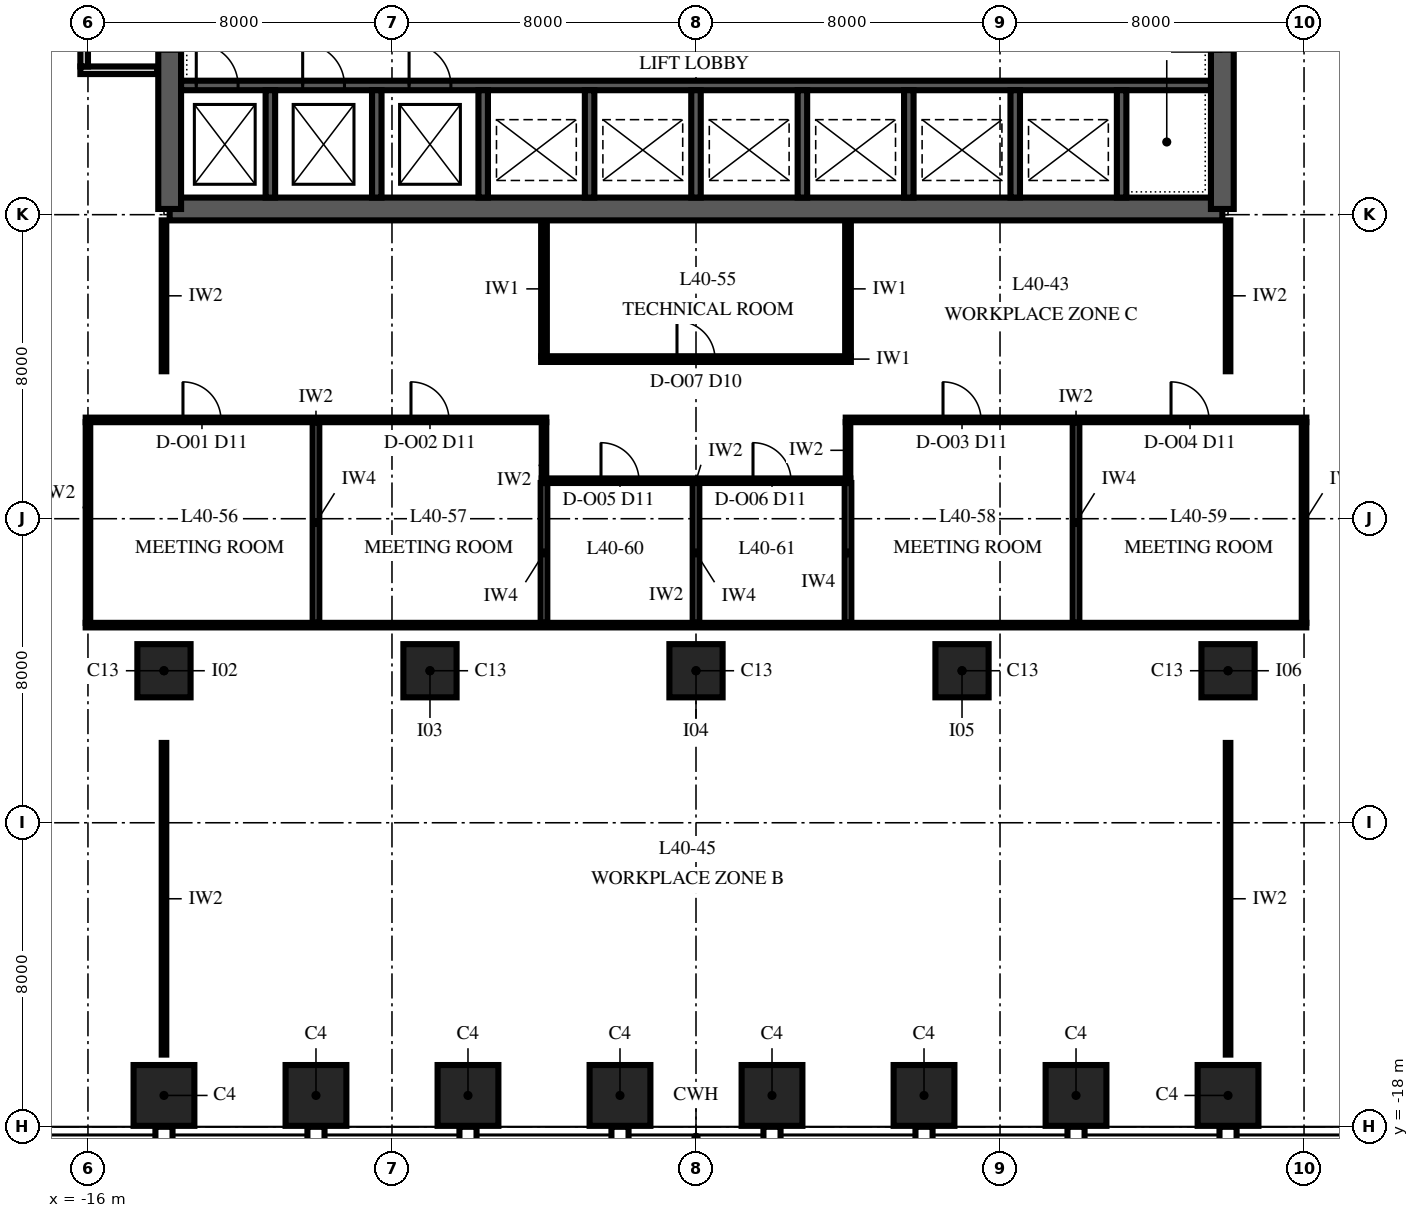
"""IFC4 building model, lengths in metres.
Left out: names, types, materials, properties, quantities, classifications, styles, units other than length and angle.
Written with IfcOpenShell. Run it as: python <this file> out.ifc"""

import sys

from ifc_helpers import new_model, si_unit, direction, frame, frame_2d, origin, origin_2d, place, context, subcontext, project, spatial, polyline, rectangle, outline, extrude, element, fill, save


model = new_model("IFC4")
c1 = context("Model", 3, precision=1e-05, world=origin(), true_north=direction((0.0, 1.0)))
c2 = subcontext(c1, "Body", "Model", "MODEL_VIEW")
j1 = project(units=[si_unit("LENGTHUNIT", "METRE"), si_unit("PLANEANGLEUNIT", "RADIAN")], contexts=[c1])
p1 = place(None, origin())
s1 = spatial("IfcSite", under=j1, at=p1, CompositionType="ELEMENT")
p2 = place(p1, origin())
s2 = spatial("IfcBuilding", under=s1, at=p2, CompositionType="ELEMENT")
p3 = place(p2, frame((0.0, 0.0, 178.0)))
s3 = spatial("IfcBuildingStorey", under=s2, at=p3, CompositionType="ELEMENT", Elevation=178.0)
for number, where, z_axis, x_axis in (
    (1, (-14.0, -17.175, 0.0), (0.0, 0.0, 1.0), (1.0, 0.0, 0.0)),
    (2, (-10.0, -17.175, 0.0), (0.0, 0.0, 1.0), (1.0, 0.0, 0.0)),
    (3, (-6.0, -17.175, 0.0), (0.0, 0.0, 1.0), (1.0, 0.0, 0.0)),
    (4, (-2.0, -17.175, 0.0), (0.0, 0.0, 1.0), (1.0, 0.0, 0.0)),
    (5, (2.0, -17.175, 0.0), (0.0, 0.0, 1.0), (1.0, 0.0, 0.0)),
    (6, (6.0, -17.175, 0.0), (0.0, 0.0, 1.0), (1.0, 0.0, 0.0)),
    (7, (10.0, -17.175, 0.0), (0.0, 0.0, 1.0), (1.0, 0.0, 0.0)),
    (8, (14.0, -17.175, 0.0), (0.0, 0.0, 1.0), (1.0, 0.0, 0.0)),
):
    element("IfcColumn", number, at=place(p3, frame(where, z_axis=z_axis, x_axis=x_axis)), inside=s3, PredefinedType="COLUMN", context=c2, shape_type="SweptSolid", body=[
        extrude(rectangle(XDim=1.6, YDim=1.6, at=origin_2d()), origin(), (0.0, 0.0, 1.0), 4.0),
    ])
for number, where, z_axis, x_axis in (
    (9, (-14.0, -6.0, 0.0), (0.0, 0.0, 1.0), (1.0, 0.0, 0.0)),
    (10, (-7.0, -6.0, 0.0), (0.0, 0.0, 1.0), (1.0, 0.0, 0.0)),
    (11, (0.0, -6.0, 0.0), (0.0, 0.0, 1.0), (1.0, 0.0, 0.0)),
    (12, (7.0, -6.0, 0.0), (0.0, 0.0, 1.0), (1.0, 0.0, 0.0)),
    (13, (14.0, -6.0, 0.0), (0.0, 0.0, 1.0), (1.0, 0.0, 0.0)),
):
    element("IfcColumn", number, at=place(p3, frame(where, z_axis=z_axis, x_axis=x_axis)), inside=s3, PredefinedType="COLUMN", context=c2, shape_type="SweptSolid", body=[
        extrude(rectangle(XDim=1.4, YDim=1.4, at=origin_2d()), origin(), (0.0, 0.0, 1.0), 4.0),
    ])
p4 = place(p3, frame((-13.85, 6.15, 0.0), z_axis=(0.0, 0.0, 1.0), x_axis=(1.0, 0.0, 0.0)))
e14 = element("IfcWall", 14, at=p4, inside=s3, PredefinedType="SHEAR", context=c2, shape_type="SweptSolid", body=[
    extrude(rectangle(XDim=27.7, YDim=0.6, at=frame_2d((13.85, 0.0))), origin(), (0.0, 0.0, 1.0), 4.0),
])
p5 = place(p3, frame((13.85, 6.15, 0.0), z_axis=(0.0, 0.0, 1.0), x_axis=(0.0, 1.0, 0.0)))
e15 = element("IfcWall", 15, at=p5, inside=s3, PredefinedType="SHEAR", context=c2, shape_type="SweptSolid", body=[
    extrude(outline(polyline([(0.0, -0.3), (17.7, -0.3), (17.7, 0.0), (17.4, 0.0), (17.4, 0.3), (0.3, 0.3), (0.3, 0.0), (0.0, 0.0), (0.0, -0.3)])), origin(), (0.0, 0.0, 1.0), 4.0),
])
p6 = place(p5, frame((4.15, 0.0, 0.0)))
e16 = element("IfcOpeningElement", 16, at=p6, cuts=e15, PredefinedType="OPENING", context=c2, shape_type="SweptSolid", body=[
    extrude(rectangle(XDim=1.8, YDim=2.4, at=frame_2d((0.9, 1.2))), frame((0.0, 0.315, 0.0), z_axis=(0.0, -1.0, 0.0), x_axis=(1.0, 0.0, 0.0)), (0.0, 0.0, 1.0), 0.63),
])
p7 = place(p3, frame((-13.85, 23.85, 0.0), z_axis=(0.0, 0.0, 1.0), x_axis=(0.0, -1.0, 0.0)))
e17 = element("IfcWall", 17, at=p7, inside=s3, PredefinedType="SHEAR", context=c2, shape_type="SweptSolid", body=[
    extrude(outline(polyline([(0.0, -0.3), (17.7, -0.3), (17.7, 0.0), (17.4, 0.0), (17.4, 0.3), (0.3, 0.3), (0.3, 0.0), (0.0, 0.0), (0.0, -0.3)])), origin(), (0.0, 0.0, 1.0), 4.0),
])
p8 = place(p7, frame((11.75, 0.0, 0.0)))
e18 = element("IfcOpeningElement", 18, at=p8, cuts=e17, PredefinedType="OPENING", context=c2, shape_type="SweptSolid", body=[
    extrude(rectangle(XDim=1.8, YDim=2.4, at=frame_2d((0.9, 1.2))), frame((0.0, 0.315, 0.0), z_axis=(0.0, -1.0, 0.0), x_axis=(1.0, 0.0, 0.0)), (0.0, 0.0, 1.0), 0.63),
])
p9 = place(p3, frame((-13.55, 9.4, 0.0), z_axis=(0.0, 0.0, 1.0), x_axis=(1.0, 0.0, 0.0)))
e19 = element("IfcWall", 19, at=p9, inside=s3, PredefinedType="SHEAR", context=c2, shape_type="SweptSolid", body=[
    extrude(rectangle(XDim=27.1, YDim=0.25, at=frame_2d((13.55, 0.0))), origin(), (0.0, 0.0, 1.0), 4.0),
])
p10 = place(p9, frame((0.4, 0.0, 0.0)))
e20 = element("IfcOpeningElement", 20, at=p10, cuts=e19, PredefinedType="OPENING", context=c2, shape_type="SweptSolid", body=[
    extrude(rectangle(XDim=1.1, YDim=2.1, at=frame_2d((0.55, 1.05))), frame((0.0, 0.14, 0.0), z_axis=(0.0, -1.0, 0.0), x_axis=(1.0, 0.0, 0.0)), (0.0, 0.0, 1.0), 0.28),
])
p11 = place(p9, frame((3.2, 0.0, 0.0)))
e21 = element("IfcOpeningElement", 21, at=p11, cuts=e19, PredefinedType="OPENING", context=c2, shape_type="SweptSolid", body=[
    extrude(rectangle(XDim=1.1, YDim=2.1, at=frame_2d((0.55, 1.05))), frame((0.0, 0.14, 0.0), z_axis=(0.0, -1.0, 0.0), x_axis=(1.0, 0.0, 0.0)), (0.0, 0.0, 1.0), 0.28),
])
p12 = place(p9, frame((6.0, 0.0, 0.0)))
e22 = element("IfcOpeningElement", 22, at=p12, cuts=e19, PredefinedType="OPENING", context=c2, shape_type="SweptSolid", body=[
    extrude(rectangle(XDim=1.1, YDim=2.1, at=frame_2d((0.55, 1.05))), frame((0.0, 0.14, 0.0), z_axis=(0.0, -1.0, 0.0), x_axis=(1.0, 0.0, 0.0)), (0.0, 0.0, 1.0), 0.28),
])
for number, where, z_axis, x_axis in (
    (23, (-11.2, 6.45, 0.0), (0.0, 0.0, 1.0), (0.0, 1.0, 0.0)),
    (24, (-8.4, 6.45, 0.0), (0.0, 0.0, 1.0), (0.0, 1.0, 0.0)),
    (25, (-5.6, 6.45, 0.0), (0.0, 0.0, 1.0), (0.0, 1.0, 0.0)),
    (26, (-2.8, 6.45, 0.0), (0.0, 0.0, 1.0), (0.0, 1.0, 0.0)),
    (27, (0.0, 6.45, 0.0), (0.0, 0.0, 1.0), (0.0, 1.0, 0.0)),
    (28, (2.8, 6.45, 0.0), (0.0, 0.0, 1.0), (0.0, 1.0, 0.0)),
    (29, (5.6, 6.45, 0.0), (0.0, 0.0, 1.0), (0.0, 1.0, 0.0)),
    (30, (8.4, 6.45, 0.0), (0.0, 0.0, 1.0), (0.0, 1.0, 0.0)),
    (31, (11.2, 6.45, 0.0), (0.0, 0.0, 1.0), (0.0, 1.0, 0.0)),
):
    element("IfcWall", number, at=place(p3, frame(where, z_axis=z_axis, x_axis=x_axis)), inside=s3, PredefinedType="SHEAR", context=c2, shape_type="SweptSolid", body=[
        extrude(rectangle(XDim=2.825, YDim=0.25, at=frame_2d((1.413, 0.0))), origin(), (0.0, 0.0, 1.0), 4.0),
    ])
p13 = place(p3, frame((-16.06, -4.8, 0.0), z_axis=(0.0, 0.0, 1.0), x_axis=(1.0, 0.0, 0.0)))
e32 = element("IfcWall", 32, at=p13, inside=s3, PredefinedType="PARTITIONING", context=c2, shape_type="SweptSolid", body=[
    extrude(rectangle(XDim=32.12, YDim=0.12, at=frame_2d((16.06, 0.0))), origin(), (0.0, 0.0, 1.0), 3.25),
])
p14 = place(p3, frame((-4.06, -1.0, 0.0), z_axis=(0.0, 0.0, 1.0), x_axis=(1.0, 0.0, 0.0)))
e33 = element("IfcWall", 33, at=p14, inside=s3, PredefinedType="PARTITIONING", context=c2, shape_type="SweptSolid", body=[
    extrude(rectangle(XDim=8.12, YDim=0.12, at=frame_2d((4.06, 0.0))), origin(), (0.0, 0.0, 1.0), 3.25),
])
p15 = place(p14, frame((1.56, 0.0, 0.0)))
e34 = element("IfcOpeningElement", 34, at=p15, cuts=e33, PredefinedType="OPENING", context=c2, shape_type="SweptSolid", body=[
    extrude(rectangle(XDim=1.0, YDim=2.4, at=frame_2d((0.5, 1.2))), frame((0.0, 0.075, 0.0), z_axis=(0.0, -1.0, 0.0), x_axis=(1.0, 0.0, 0.0)), (0.0, 0.0, 1.0), 0.15),
])
p16 = place(p14, frame((5.56, 0.0, 0.0)))
e35 = element("IfcOpeningElement", 35, at=p16, cuts=e33, PredefinedType="OPENING", context=c2, shape_type="SweptSolid", body=[
    extrude(rectangle(XDim=1.0, YDim=2.4, at=frame_2d((0.5, 1.2))), frame((0.0, 0.075, 0.0), z_axis=(0.0, -1.0, 0.0), x_axis=(1.0, 0.0, 0.0)), (0.0, 0.0, 1.0), 0.15),
])
p17 = place(p3, frame((-16.06, 0.6, 0.0), z_axis=(0.0, 0.0, 1.0), x_axis=(1.0, 0.0, 0.0)))
e36 = element("IfcWall", 36, at=p17, inside=s3, PredefinedType="PARTITIONING", context=c2, shape_type="SweptSolid", body=[
    extrude(rectangle(XDim=12.12, YDim=0.12, at=frame_2d((6.06, 0.0))), origin(), (0.0, 0.0, 1.0), 3.25),
])
p18 = place(p17, frame((2.56, 0.0, 0.0)))
e37 = element("IfcOpeningElement", 37, at=p18, cuts=e36, PredefinedType="OPENING", context=c2, shape_type="SweptSolid", body=[
    extrude(rectangle(XDim=1.0, YDim=2.4, at=frame_2d((0.5, 1.2))), frame((0.0, 0.075, 0.0), z_axis=(0.0, -1.0, 0.0), x_axis=(1.0, 0.0, 0.0)), (0.0, 0.0, 1.0), 0.15),
])
p19 = place(p17, frame((8.56, 0.0, 0.0)))
e38 = element("IfcOpeningElement", 38, at=p19, cuts=e36, PredefinedType="OPENING", context=c2, shape_type="SweptSolid", body=[
    extrude(rectangle(XDim=1.0, YDim=2.4, at=frame_2d((0.5, 1.2))), frame((0.0, 0.075, 0.0), z_axis=(0.0, -1.0, 0.0), x_axis=(1.0, 0.0, 0.0)), (0.0, 0.0, 1.0), 0.15),
])
p20 = place(p3, frame((3.94, 0.6, 0.0), z_axis=(0.0, 0.0, 1.0), x_axis=(1.0, 0.0, 0.0)))
e39 = element("IfcWall", 39, at=p20, inside=s3, PredefinedType="PARTITIONING", context=c2, shape_type="SweptSolid", body=[
    extrude(rectangle(XDim=12.12, YDim=0.12, at=frame_2d((6.06, 0.0))), origin(), (0.0, 0.0, 1.0), 3.25),
])
p21 = place(p20, frame((2.56, 0.0, 0.0)))
e40 = element("IfcOpeningElement", 40, at=p21, cuts=e39, PredefinedType="OPENING", context=c2, shape_type="SweptSolid", body=[
    extrude(rectangle(XDim=1.0, YDim=2.4, at=frame_2d((0.5, 1.2))), frame((0.0, 0.075, 0.0), z_axis=(0.0, -1.0, 0.0), x_axis=(1.0, 0.0, 0.0)), (0.0, 0.0, 1.0), 0.15),
])
p22 = place(p20, frame((8.56, 0.0, 0.0)))
e41 = element("IfcOpeningElement", 41, at=p22, cuts=e39, PredefinedType="OPENING", context=c2, shape_type="SweptSolid", body=[
    extrude(rectangle(XDim=1.0, YDim=2.4, at=frame_2d((0.5, 1.2))), frame((0.0, 0.075, 0.0), z_axis=(0.0, -1.0, 0.0), x_axis=(1.0, 0.0, 0.0)), (0.0, 0.0, 1.0), 0.15),
])
p23 = place(p3, frame((-4.075, 2.2, 0.0), z_axis=(0.0, 0.0, 1.0), x_axis=(1.0, 0.0, 0.0)))
e42 = element("IfcWall", 42, at=p23, inside=s3, PredefinedType="PARTITIONING", context=c2, shape_type="SweptSolid", body=[
    extrude(rectangle(XDim=8.15, YDim=0.15, at=frame_2d((4.075, 0.0))), origin(), (0.0, 0.0, 1.0), 3.25),
])
p24 = place(p23, frame((3.575, 0.0, 0.0)))
e43 = element("IfcOpeningElement", 43, at=p24, cuts=e42, PredefinedType="OPENING", context=c2, shape_type="SweptSolid", body=[
    extrude(rectangle(XDim=1.0, YDim=2.3, at=frame_2d((0.5, 1.15))), frame((0.0, 0.09, 0.0), z_axis=(0.0, -1.0, 0.0), x_axis=(1.0, 0.0, 0.0)), (0.0, 0.0, 1.0), 0.18),
])
p25 = place(p3, frame((-16.2, 9.8, 0.0), z_axis=(0.0, 0.0, 1.0), x_axis=(1.0, 0.0, 0.0)))
e44 = element("IfcWall", 44, at=p25, inside=s3, PredefinedType="PARTITIONING", context=c2, shape_type="SweptSolid", body=[
    extrude(rectangle(XDim=2.02, YDim=0.2, at=frame_2d((1.01, 0.0))), origin(), (0.0, 0.0, 1.0), 3.85),
])
p26 = place(p3, frame((-16.1, 9.9, 0.0), z_axis=(0.0, 0.0, 1.0), x_axis=(0.0, 1.0, 0.0)))
e45 = element("IfcWall", 45, at=p26, inside=s3, PredefinedType="PARTITIONING", context=c2, shape_type="SweptSolid", body=[
    extrude(rectangle(XDim=16.1, YDim=0.2, at=frame_2d((8.05, 0.0))), origin(), (0.0, 0.0, 1.0), 3.25),
])
p27 = place(p26, frame((7.88, 0.0, 0.0)))
e46 = element("IfcOpeningElement", 46, at=p27, cuts=e45, PredefinedType="OPENING", context=c2, shape_type="SweptSolid", body=[
    extrude(rectangle(XDim=1.2, YDim=2.4, at=frame_2d((0.6, 1.2))), frame((0.0, 0.115, 0.0), z_axis=(0.0, -1.0, 0.0), x_axis=(1.0, 0.0, 0.0)), (0.0, 0.0, 1.0), 0.23),
])
p28 = place(p3, frame((-16.0, -4.74, 0.0), z_axis=(0.0, 0.0, 1.0), x_axis=(0.0, 1.0, 0.0)))
e47 = element("IfcWall", 47, at=p28, inside=s3, PredefinedType="PARTITIONING", context=c2, shape_type="SweptSolid", body=[
    extrude(rectangle(XDim=5.28, YDim=0.12, at=frame_2d((2.64, 0.0))), origin(), (0.0, 0.0, 1.0), 3.85),
])
p29 = place(p3, frame((-10.0, -4.74, 0.0), z_axis=(0.0, 0.0, 1.0), x_axis=(0.0, 1.0, 0.0)))
e48 = element("IfcWall", 48, at=p29, inside=s3, PredefinedType="PARTITIONING", context=c2, shape_type="SweptSolid", body=[
    extrude(rectangle(XDim=5.28, YDim=0.175, at=frame_2d((2.64, 0.0))), origin(), (0.0, 0.0, 1.0), 3.25),
])
p30 = place(p3, frame((-4.0, -4.74, 0.0), z_axis=(0.0, 0.0, 1.0), x_axis=(0.0, 1.0, 0.0)))
e49 = element("IfcWall", 49, at=p30, inside=s3, PredefinedType="PARTITIONING", context=c2, shape_type="SweptSolid", body=[
    extrude(rectangle(XDim=3.68, YDim=0.175, at=frame_2d((1.84, 0.0))), origin(), (0.0, 0.0, 1.0), 3.85),
])
p31 = place(p3, frame((-4.0, -0.94, 0.0), z_axis=(0.0, 0.0, 1.0), x_axis=(0.0, 1.0, 0.0)))
e50 = element("IfcWall", 50, at=p31, inside=s3, PredefinedType="PARTITIONING", context=c2, shape_type="SweptSolid", body=[
    extrude(rectangle(XDim=1.48, YDim=0.12, at=frame_2d((0.74, 0.0))), origin(), (0.0, 0.0, 1.0), 3.85),
])
p32 = place(p3, frame((-4.0, 2.275, 0.0), z_axis=(0.0, 0.0, 1.0), x_axis=(0.0, 1.0, 0.0)))
e51 = element("IfcWall", 51, at=p32, inside=s3, PredefinedType="PARTITIONING", context=c2, shape_type="SweptSolid", body=[
    extrude(rectangle(XDim=3.545, YDim=0.15, at=frame_2d((1.772, 0.0))), origin(), (0.0, 0.0, 1.0), 3.85),
])
for number, where, z_axis, x_axis in (
    (52, (0.0, -4.74, 0.0), (0.0, 0.0, 1.0), (0.0, 1.0, 0.0)),
    (53, (4.0, -4.74, 0.0), (0.0, 0.0, 1.0), (0.0, 1.0, 0.0)),
):
    element("IfcWall", number, at=place(p3, frame(where, z_axis=z_axis, x_axis=x_axis)), inside=s3, PredefinedType="PARTITIONING", context=c2, shape_type="SweptSolid", body=[
        extrude(rectangle(XDim=3.68, YDim=0.175, at=frame_2d((1.84, 0.0))), origin(), (0.0, 0.0, 1.0), 3.85),
    ])
p33 = place(p3, frame((4.0, -0.94, 0.0), z_axis=(0.0, 0.0, 1.0), x_axis=(0.0, 1.0, 0.0)))
e54 = element("IfcWall", 54, at=p33, inside=s3, PredefinedType="PARTITIONING", context=c2, shape_type="SweptSolid", body=[
    extrude(rectangle(XDim=1.48, YDim=0.12, at=frame_2d((0.74, 0.0))), origin(), (0.0, 0.0, 1.0), 3.85),
])
p34 = place(p3, frame((4.0, 2.275, 0.0), z_axis=(0.0, 0.0, 1.0), x_axis=(0.0, 1.0, 0.0)))
e55 = element("IfcWall", 55, at=p34, inside=s3, PredefinedType="PARTITIONING", context=c2, shape_type="SweptSolid", body=[
    extrude(rectangle(XDim=3.545, YDim=0.15, at=frame_2d((1.772, 0.0))), origin(), (0.0, 0.0, 1.0), 3.85),
])
p35 = place(p3, frame((10.0, -4.74, 0.0), z_axis=(0.0, 0.0, 1.0), x_axis=(0.0, 1.0, 0.0)))
e56 = element("IfcWall", 56, at=p35, inside=s3, PredefinedType="PARTITIONING", context=c2, shape_type="SweptSolid", body=[
    extrude(rectangle(XDim=5.28, YDim=0.175, at=frame_2d((2.64, 0.0))), origin(), (0.0, 0.0, 1.0), 3.25),
])
p36 = place(p3, frame((16.0, -4.74, 0.0), z_axis=(0.0, 0.0, 1.0), x_axis=(0.0, 1.0, 0.0)))
e57 = element("IfcWall", 57, at=p36, inside=s3, PredefinedType="PARTITIONING", context=c2, shape_type="SweptSolid", body=[
    extrude(rectangle(XDim=5.28, YDim=0.12, at=frame_2d((2.64, 0.0))), origin(), (0.0, 0.0, 1.0), 3.85),
])
p37 = place(p3, frame((-13.999, -16.1, 0.0), z_axis=(0.0, 0.0, 1.0), x_axis=(0.0, 1.0, 0.0)))
e58 = element("IfcWall", 58, at=p37, inside=s3, PredefinedType="PARTITIONING", context=c2, shape_type="SweptSolid", body=[
    extrude(rectangle(XDim=8.2, YDim=0.12, at=frame_2d((4.1, 0.0))), origin(), (0.0, 0.0, 1.0), 3.25),
])
p38 = place(p3, frame((-13.999, 1.88, 0.0), z_axis=(0.0, 0.0, 1.0), x_axis=(0.0, 1.0, 0.0)))
e59 = element("IfcWall", 59, at=p38, inside=s3, PredefinedType="PARTITIONING", context=c2, shape_type="SweptSolid", body=[
    extrude(rectangle(XDim=3.97, YDim=0.12, at=frame_2d((1.985, 0.0))), origin(), (0.0, 0.0, 1.0), 3.25),
])
p39 = place(p3, frame((14.001, -16.1, 0.0), z_axis=(0.0, 0.0, 1.0), x_axis=(0.0, 1.0, 0.0)))
e60 = element("IfcWall", 60, at=p39, inside=s3, PredefinedType="PARTITIONING", context=c2, shape_type="SweptSolid", body=[
    extrude(rectangle(XDim=8.2, YDim=0.12, at=frame_2d((4.1, 0.0))), origin(), (0.0, 0.0, 1.0), 3.25),
])
p40 = place(p3, frame((14.001, 1.88, 0.0), z_axis=(0.0, 0.0, 1.0), x_axis=(0.0, 1.0, 0.0)))
e61 = element("IfcWall", 61, at=p40, inside=s3, PredefinedType="PARTITIONING", context=c2, shape_type="SweptSolid", body=[
    extrude(rectangle(XDim=3.97, YDim=0.12, at=frame_2d((1.985, 0.0))), origin(), (0.0, 0.0, 1.0), 3.25),
])
p41 = place(p10, origin())
e62 = element("IfcDoor", 62, at=p41, inside=s3, OperationType="SLIDING_TO_LEFT", PredefinedType="DOOR", context=c2, shape_type="SweptSolid", body=[
    extrude(rectangle(XDim=1.1, YDim=2.1, at=frame_2d((0.55, 1.05))), frame((0.0, 0.125, 0.0), z_axis=(0.0, -1.0, 0.0), x_axis=(1.0, 0.0, 0.0)), (0.0, 0.0, 1.0), 0.25),
])
fill(e20, e62)
p42 = place(p11, origin())
e63 = element("IfcDoor", 63, at=p42, inside=s3, OperationType="SLIDING_TO_LEFT", PredefinedType="DOOR", context=c2, shape_type="SweptSolid", body=[
    extrude(rectangle(XDim=1.1, YDim=2.1, at=frame_2d((0.55, 1.05))), frame((0.0, 0.125, 0.0), z_axis=(0.0, -1.0, 0.0), x_axis=(1.0, 0.0, 0.0)), (0.0, 0.0, 1.0), 0.25),
])
fill(e21, e63)
p43 = place(p12, origin())
e64 = element("IfcDoor", 64, at=p43, inside=s3, OperationType="SLIDING_TO_LEFT", PredefinedType="DOOR", context=c2, shape_type="SweptSolid", body=[
    extrude(rectangle(XDim=1.1, YDim=2.1, at=frame_2d((0.55, 1.05))), frame((0.0, 0.125, 0.0), z_axis=(0.0, -1.0, 0.0), x_axis=(1.0, 0.0, 0.0)), (0.0, 0.0, 1.0), 0.25),
])
fill(e22, e64)
p44 = place(p18, origin())
e65 = element("IfcDoor", 65, at=p44, inside=s3, OperationType="SINGLE_SWING_RIGHT", PredefinedType="DOOR", context=c2, shape_type="SweptSolid", body=[
    extrude(rectangle(XDim=1.0, YDim=2.4, at=frame_2d((0.5, 1.2))), frame((0.0, 0.06, 0.0), z_axis=(0.0, -1.0, 0.0), x_axis=(1.0, 0.0, 0.0)), (0.0, 0.0, 1.0), 0.12),
])
fill(e37, e65)
p45 = place(p19, origin())
e66 = element("IfcDoor", 66, at=p45, inside=s3, OperationType="SINGLE_SWING_RIGHT", PredefinedType="DOOR", context=c2, shape_type="SweptSolid", body=[
    extrude(rectangle(XDim=1.0, YDim=2.4, at=frame_2d((0.5, 1.2))), frame((0.0, 0.06, 0.0), z_axis=(0.0, -1.0, 0.0), x_axis=(1.0, 0.0, 0.0)), (0.0, 0.0, 1.0), 0.12),
])
fill(e38, e66)
p46 = place(p21, origin())
e67 = element("IfcDoor", 67, at=p46, inside=s3, OperationType="SINGLE_SWING_RIGHT", PredefinedType="DOOR", context=c2, shape_type="SweptSolid", body=[
    extrude(rectangle(XDim=1.0, YDim=2.4, at=frame_2d((0.5, 1.2))), frame((0.0, 0.06, 0.0), z_axis=(0.0, -1.0, 0.0), x_axis=(1.0, 0.0, 0.0)), (0.0, 0.0, 1.0), 0.12),
])
fill(e40, e67)
p47 = place(p22, origin())
e68 = element("IfcDoor", 68, at=p47, inside=s3, OperationType="SINGLE_SWING_RIGHT", PredefinedType="DOOR", context=c2, shape_type="SweptSolid", body=[
    extrude(rectangle(XDim=1.0, YDim=2.4, at=frame_2d((0.5, 1.2))), frame((0.0, 0.06, 0.0), z_axis=(0.0, -1.0, 0.0), x_axis=(1.0, 0.0, 0.0)), (0.0, 0.0, 1.0), 0.12),
])
fill(e41, e68)
p48 = place(p15, origin())
e69 = element("IfcDoor", 69, at=p48, inside=s3, OperationType="SINGLE_SWING_RIGHT", PredefinedType="DOOR", context=c2, shape_type="SweptSolid", body=[
    extrude(rectangle(XDim=1.0, YDim=2.4, at=frame_2d((0.5, 1.2))), frame((0.0, 0.06, 0.0), z_axis=(0.0, -1.0, 0.0), x_axis=(1.0, 0.0, 0.0)), (0.0, 0.0, 1.0), 0.12),
])
fill(e34, e69)
p49 = place(p16, origin())
e70 = element("IfcDoor", 70, at=p49, inside=s3, OperationType="SINGLE_SWING_RIGHT", PredefinedType="DOOR", context=c2, shape_type="SweptSolid", body=[
    extrude(rectangle(XDim=1.0, YDim=2.4, at=frame_2d((0.5, 1.2))), frame((0.0, 0.06, 0.0), z_axis=(0.0, -1.0, 0.0), x_axis=(1.0, 0.0, 0.0)), (0.0, 0.0, 1.0), 0.12),
])
fill(e35, e70)
p50 = place(p24, origin())
e71 = element("IfcDoor", 71, at=p50, inside=s3, OperationType="SINGLE_SWING_LEFT", PredefinedType="DOOR", context=c2, shape_type="SweptSolid", body=[
    extrude(rectangle(XDim=1.0, YDim=2.3, at=frame_2d((0.5, 1.15))), frame((0.0, 0.075, 0.0), z_axis=(0.0, -1.0, 0.0), x_axis=(1.0, 0.0, 0.0)), (0.0, 0.0, 1.0), 0.149),
])
fill(e43, e71)
save(model, sys.argv[1])
